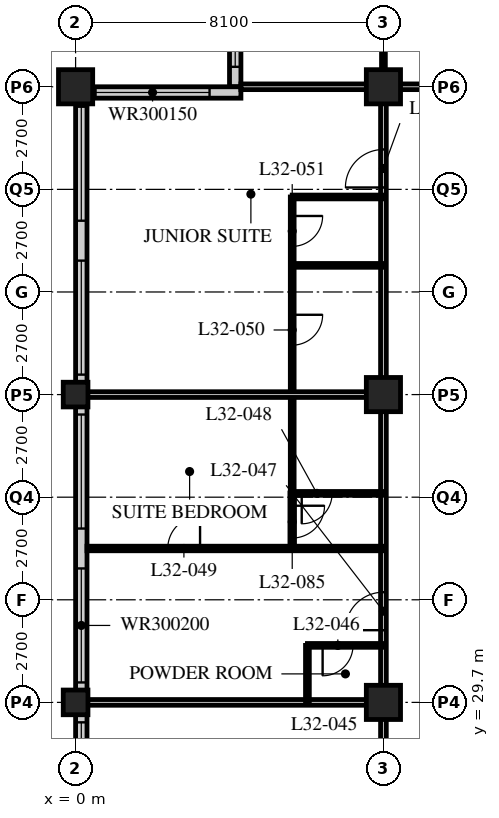
"""IFC4 building model, lengths in metres.
Left out: names, types, materials, properties, quantities, classifications, styles, units other than length and angle.
Written with IfcOpenShell. Run it as: python <this file> out.ifc"""

import sys

from ifc_helpers import new_model, si_unit, direction, frame, frame_2d, origin, origin_2d, place, context, subcontext, project, spatial, rectangle, hollow_rectangle, extrude, element, fill, save


model = new_model("IFC4")
c1 = context("Model", 3, precision=1e-05, world=origin(), true_north=direction((0.0, 1.0)))
c2 = subcontext(c1, "Body", "Model", "MODEL_VIEW")
j1 = project(units=[si_unit("LENGTHUNIT", "METRE"), si_unit("PLANEANGLEUNIT", "RADIAN")], contexts=[c1])
p1 = place(None, origin())
s1 = spatial("IfcSite", under=j1, at=p1, CompositionType="ELEMENT")
p2 = place(p1, origin())
s2 = spatial("IfcBuilding", under=s1, at=p2, CompositionType="ELEMENT")
p3 = place(p2, frame((0.0, 0.0, 127.2)))
s3 = spatial("IfcBuildingStorey", under=s2, at=p3, CompositionType="ELEMENT", Elevation=127.2)
for number, where, z_axis, x_axis in (
    (1, (0.0, 29.7, 0.0), (0.0, 0.0, 1.0), (1.0, 0.0, 0.0)),
    (2, (0.0, 37.8, 0.0), (0.0, 0.0, 1.0), (1.0, 0.0, 0.0)),
):
    element("IfcColumn", number, at=place(p3, frame(where, z_axis=z_axis, x_axis=x_axis)), inside=s3, PredefinedType="COLUMN", context=c2, shape_type="SweptSolid", body=[
        extrude(hollow_rectangle(XDim=0.65, YDim=0.65, WallThickness=0.055, at=origin_2d()), origin(), (0.0, 0.0, 1.0), 3.4),
    ])
for number, where, z_axis, x_axis in (
    (3, (0.0, 45.9, 0.0), (0.0, 0.0, 1.0), (1.0, 0.0, 0.0)),
    (4, (8.1, 29.7, 0.0), (0.0, 0.0, 1.0), (1.0, 0.0, 0.0)),
    (5, (8.1, 37.8, 0.0), (0.0, 0.0, 1.0), (1.0, 0.0, 0.0)),
    (6, (8.1, 45.9, 0.0), (0.0, 0.0, 1.0), (1.0, 0.0, 0.0)),
):
    element("IfcColumn", number, at=place(p3, frame(where, z_axis=z_axis, x_axis=x_axis)), inside=s3, PredefinedType="COLUMN", context=c2, shape_type="SweptSolid", body=[
        extrude(hollow_rectangle(XDim=0.9, YDim=0.9, WallThickness=0.09, at=origin_2d()), origin(), (0.0, 0.0, 1.0), 3.4),
    ])
p4 = place(p3, frame((4.2, 49.65, 0.0), z_axis=(0.0, 0.0, 1.0), x_axis=(0.0, -1.0, 0.0)))
e7 = element("IfcWall", 7, at=p4, inside=s3, PredefinedType="SOLIDWALL", context=c2, shape_type="SweptSolid", body=[
    extrude(rectangle(XDim=3.75, YDim=0.3, at=frame_2d((1.875, 0.0))), origin(), (0.0, 0.0, 1.0), 3.19),
])
p5 = place(p4, frame((0.225, 0.0, 0.9)))
e8 = element("IfcOpeningElement", 8, at=p5, cuts=e7, PredefinedType="OPENING", context=c2, shape_type="SweptSolid", body=[
    extrude(rectangle(XDim=3.0, YDim=1.5, at=frame_2d((1.5, 0.75))), frame((0.0, 0.16, 0.0), z_axis=(0.0, -1.0, 0.0), x_axis=(1.0, 0.0, 0.0)), (0.0, 0.0, 1.0), 0.32),
])
p6 = place(p3, frame((4.35, 45.75, 0.0), z_axis=(0.0, 0.0, 1.0), x_axis=(-1.0, 0.0, 0.0)))
e9 = element("IfcWall", 9, at=p6, inside=s3, PredefinedType="SOLIDWALL", context=c2, shape_type="SweptSolid", body=[
    extrude(rectangle(XDim=4.35, YDim=0.3, at=frame_2d((2.175, 0.0))), origin(), (0.0, 0.0, 1.0), 3.19),
])
p7 = place(p6, frame((0.825, 0.0, 0.9)))
e10 = element("IfcOpeningElement", 10, at=p7, cuts=e9, PredefinedType="OPENING", context=c2, shape_type="SweptSolid", body=[
    extrude(rectangle(XDim=3.0, YDim=1.5, at=frame_2d((1.5, 0.75))), frame((0.0, 0.16, 0.0), z_axis=(0.0, -1.0, 0.0), x_axis=(1.0, 0.0, 0.0)), (0.0, 0.0, 1.0), 0.32),
])
p8 = place(p3, frame((0.15, 45.6, 0.0), z_axis=(0.0, 0.0, 1.0), x_axis=(0.0, -1.0, 0.0)))
e11 = element("IfcWall", 11, at=p8, inside=s3, PredefinedType="SOLIDWALL", context=c2, shape_type="SweptSolid", body=[
    extrude(rectangle(XDim=32.1, YDim=0.3, at=frame_2d((16.05, 0.0))), origin(), (0.0, 0.0, 1.0), 3.19),
])
p9 = place(p8, frame((0.225, 0.0, 0.9)))
e12 = element("IfcOpeningElement", 12, at=p9, cuts=e11, PredefinedType="OPENING", context=c2, shape_type="SweptSolid", body=[
    extrude(rectangle(XDim=3.0, YDim=2.0, at=frame_2d((1.5, 1.0))), frame((0.0, 0.16, 0.0), z_axis=(0.0, -1.0, 0.0), x_axis=(1.0, 0.0, 0.0)), (0.0, 0.0, 1.0), 0.32),
])
p10 = place(p8, frame((4.275, 0.0, 0.9)))
e13 = element("IfcOpeningElement", 13, at=p10, cuts=e11, PredefinedType="OPENING", context=c2, shape_type="SweptSolid", body=[
    extrude(rectangle(XDim=3.0, YDim=2.0, at=frame_2d((1.5, 1.0))), frame((0.0, 0.16, 0.0), z_axis=(0.0, -1.0, 0.0), x_axis=(1.0, 0.0, 0.0)), (0.0, 0.0, 1.0), 0.32),
])
p11 = place(p8, frame((8.325, 0.0, 0.9)))
e14 = element("IfcOpeningElement", 14, at=p11, cuts=e11, PredefinedType="OPENING", context=c2, shape_type="SweptSolid", body=[
    extrude(rectangle(XDim=3.0, YDim=2.0, at=frame_2d((1.5, 1.0))), frame((0.0, 0.16, 0.0), z_axis=(0.0, -1.0, 0.0), x_axis=(1.0, 0.0, 0.0)), (0.0, 0.0, 1.0), 0.32),
])
p12 = place(p8, frame((12.375, 0.0, 0.9)))
e15 = element("IfcOpeningElement", 15, at=p12, cuts=e11, PredefinedType="OPENING", context=c2, shape_type="SweptSolid", body=[
    extrude(rectangle(XDim=3.0, YDim=2.0, at=frame_2d((1.5, 1.0))), frame((0.0, 0.16, 0.0), z_axis=(0.0, -1.0, 0.0), x_axis=(1.0, 0.0, 0.0)), (0.0, 0.0, 1.0), 0.32),
])
p13 = place(p8, frame((16.425, 0.0, 0.9)))
e16 = element("IfcOpeningElement", 16, at=p13, cuts=e11, PredefinedType="OPENING", context=c2, shape_type="SweptSolid", body=[
    extrude(rectangle(XDim=3.0, YDim=2.0, at=frame_2d((1.5, 1.0))), frame((0.0, 0.16, 0.0), z_axis=(0.0, -1.0, 0.0), x_axis=(1.0, 0.0, 0.0)), (0.0, 0.0, 1.0), 0.32),
])
p14 = place(p8, frame((20.475, 0.0, 0.9)))
e17 = element("IfcOpeningElement", 17, at=p14, cuts=e11, PredefinedType="OPENING", context=c2, shape_type="SweptSolid", body=[
    extrude(rectangle(XDim=3.0, YDim=2.0, at=frame_2d((1.5, 1.0))), frame((0.0, 0.16, 0.0), z_axis=(0.0, -1.0, 0.0), x_axis=(1.0, 0.0, 0.0)), (0.0, 0.0, 1.0), 0.32),
])
p15 = place(p8, frame((24.525, 0.0, 0.9)))
e18 = element("IfcOpeningElement", 18, at=p15, cuts=e11, PredefinedType="OPENING", context=c2, shape_type="SweptSolid", body=[
    extrude(rectangle(XDim=3.0, YDim=2.0, at=frame_2d((1.5, 1.0))), frame((0.0, 0.16, 0.0), z_axis=(0.0, -1.0, 0.0), x_axis=(1.0, 0.0, 0.0)), (0.0, 0.0, 1.0), 0.32),
])
p16 = place(p8, frame((28.575, 0.0, 0.9)))
e19 = element("IfcOpeningElement", 19, at=p16, cuts=e11, PredefinedType="OPENING", context=c2, shape_type="SweptSolid", body=[
    extrude(rectangle(XDim=3.0, YDim=2.0, at=frame_2d((1.5, 1.0))), frame((0.0, 0.16, 0.0), z_axis=(0.0, -1.0, 0.0), x_axis=(1.0, 0.0, 0.0)), (0.0, 0.0, 1.0), 0.32),
])
p17 = place(p3, frame((8.1, 45.9, 0.0), z_axis=(0.0, 0.0, 1.0), x_axis=(1.0, 0.0, 0.0)))
e20 = element("IfcWall", 20, at=p17, inside=s3, PredefinedType="PARTITIONING", context=c2, shape_type="SweptSolid", body=[
    extrude(rectangle(XDim=40.5, YDim=0.15, at=frame_2d((20.25, 0.0))), origin(), (0.0, 0.0, 1.0), 2.578),
])
p18 = place(p17, frame((9.625, 0.0, 0.0)))
e21 = element("IfcOpeningElement", 21, at=p18, cuts=e20, PredefinedType="OPENING", context=c2, shape_type="SweptSolid", body=[
    extrude(rectangle(XDim=1.0, YDim=2.1, at=frame_2d((0.5, 1.05))), frame((0.0, 0.085, 0.0), z_axis=(0.0, -1.0, 0.0), x_axis=(1.0, 0.0, 0.0)), (0.0, 0.0, 1.0), 0.17),
])
p19 = place(p17, frame((21.65, 0.0, 0.0)))
e22 = element("IfcOpeningElement", 22, at=p19, cuts=e20, PredefinedType="OPENING", context=c2, shape_type="SweptSolid", body=[
    extrude(rectangle(XDim=1.0, YDim=2.1, at=frame_2d((0.5, 1.05))), frame((0.0, 0.085, 0.0), z_axis=(0.0, -1.0, 0.0), x_axis=(1.0, 0.0, 0.0)), (0.0, 0.0, 1.0), 0.17),
])
p20 = place(p17, frame((26.75, 0.0, 0.0)))
e23 = element("IfcOpeningElement", 23, at=p20, cuts=e20, PredefinedType="OPENING", context=c2, shape_type="SweptSolid", body=[
    extrude(rectangle(XDim=1.0, YDim=2.1, at=frame_2d((0.5, 1.05))), frame((0.0, 0.085, 0.0), z_axis=(0.0, -1.0, 0.0), x_axis=(1.0, 0.0, 0.0)), (0.0, 0.0, 1.0), 0.17),
])
p21 = place(p17, frame((28.95, 0.0, 0.0)))
e24 = element("IfcOpeningElement", 24, at=p21, cuts=e20, PredefinedType="OPENING", context=c2, shape_type="SweptSolid", body=[
    extrude(rectangle(XDim=1.0, YDim=2.1, at=frame_2d((0.5, 1.05))), frame((0.0, 0.085, 0.0), z_axis=(0.0, -1.0, 0.0), x_axis=(1.0, 0.0, 0.0)), (0.0, 0.0, 1.0), 0.17),
])
p22 = place(p17, frame((34.85, 0.0, 0.0)))
e25 = element("IfcOpeningElement", 25, at=p22, cuts=e20, PredefinedType="OPENING", context=c2, shape_type="SweptSolid", body=[
    extrude(rectangle(XDim=1.0, YDim=2.1, at=frame_2d((0.5, 1.05))), frame((0.0, 0.085, 0.0), z_axis=(0.0, -1.0, 0.0), x_axis=(1.0, 0.0, 0.0)), (0.0, 0.0, 1.0), 0.17),
])
p23 = place(p17, frame((36.875, 0.0, 0.0)))
e26 = element("IfcOpeningElement", 26, at=p23, cuts=e20, PredefinedType="OPENING", context=c2, shape_type="SweptSolid", body=[
    extrude(rectangle(XDim=1.0, YDim=2.1, at=frame_2d((0.5, 1.05))), frame((0.0, 0.085, 0.0), z_axis=(0.0, -1.0, 0.0), x_axis=(1.0, 0.0, 0.0)), (0.0, 0.0, 1.0), 0.17),
])
p24 = place(p17, frame((2.625, 0.0, 0.0)))
e27 = element("IfcOpeningElement", 27, at=p24, cuts=e20, PredefinedType="OPENING", context=c2, shape_type="SweptSolid", body=[
    extrude(rectangle(XDim=1.0, YDim=2.1, at=frame_2d((0.5, 1.05))), frame((0.0, 0.085, 0.0), z_axis=(0.0, -1.0, 0.0), x_axis=(1.0, 0.0, 0.0)), (0.0, 0.0, 1.0), 0.17),
])
p25 = place(p3, frame((8.1, 21.6, 0.0), z_axis=(0.0, 0.0, 1.0), x_axis=(0.0, 1.0, 0.0)))
e28 = element("IfcWall", 28, at=p25, inside=s3, PredefinedType="PARTITIONING", context=c2, shape_type="SweptSolid", body=[
    extrude(rectangle(XDim=24.3, YDim=0.15, at=frame_2d((12.15, 0.0))), origin(), (0.0, 0.0, 1.0), 2.578),
])
p26 = place(p25, frame((5.45, 0.0, 0.0)))
e29 = element("IfcOpeningElement", 29, at=p26, cuts=e28, PredefinedType="OPENING", context=c2, shape_type="SweptSolid", body=[
    extrude(rectangle(XDim=1.0, YDim=2.1, at=frame_2d((0.5, 1.05))), frame((0.0, 0.085, 0.0), z_axis=(0.0, -1.0, 0.0), x_axis=(1.0, 0.0, 0.0)), (0.0, 0.0, 1.0), 0.17),
])
p27 = place(p25, frame((10.0, 0.0, 0.0)))
e30 = element("IfcOpeningElement", 30, at=p27, cuts=e28, PredefinedType="OPENING", context=c2, shape_type="SweptSolid", body=[
    extrude(rectangle(XDim=1.0, YDim=2.1, at=frame_2d((0.5, 1.05))), frame((0.0, 0.085, 0.0), z_axis=(0.0, -1.0, 0.0), x_axis=(1.0, 0.0, 0.0)), (0.0, 0.0, 1.0), 0.17),
])
p28 = place(p25, frame((21.65, 0.0, 0.0)))
e31 = element("IfcOpeningElement", 31, at=p28, cuts=e28, PredefinedType="OPENING", context=c2, shape_type="SweptSolid", body=[
    extrude(rectangle(XDim=1.0, YDim=2.1, at=frame_2d((0.5, 1.05))), frame((0.0, 0.085, 0.0), z_axis=(0.0, -1.0, 0.0), x_axis=(1.0, 0.0, 0.0)), (0.0, 0.0, 1.0), 0.17),
])
p29 = place(p3, frame((8.1, 29.7, 0.0), z_axis=(0.0, 0.0, 1.0), x_axis=(-1.0, 0.0, 0.0)))
e32 = element("IfcWall", 32, at=p29, inside=s3, PredefinedType="PARTITIONING", context=c2, shape_type="SweptSolid", body=[
    extrude(rectangle(XDim=7.8, YDim=0.15, at=frame_2d((3.9, 0.0))), origin(), (0.0, 0.0, 1.0), 2.578),
])
p30 = place(p3, frame((6.1, 29.7, 0.0), z_axis=(0.0, 0.0, 1.0), x_axis=(0.0, 1.0, 0.0)))
e33 = element("IfcWall", 33, at=p30, inside=s3, PredefinedType="PARTITIONING", context=c2, shape_type="SweptSolid", body=[
    extrude(rectangle(XDim=1.5, YDim=0.1, at=frame_2d((0.75, 0.0))), origin(), (0.0, 0.0, 1.0), 3.19),
])
p31 = place(p3, frame((8.1, 31.2, 0.0), z_axis=(0.0, 0.0, 1.0), x_axis=(-1.0, 0.0, 0.0)))
e34 = element("IfcWall", 34, at=p31, inside=s3, PredefinedType="PARTITIONING", context=c2, shape_type="SweptSolid", body=[
    extrude(rectangle(XDim=2.0, YDim=0.1, at=frame_2d((1.0, 0.0))), origin(), (0.0, 0.0, 1.0), 3.19),
])
p32 = place(p31, frame((0.8, 0.0, 0.0)))
e35 = element("IfcOpeningElement", 35, at=p32, cuts=e34, PredefinedType="OPENING", context=c2, shape_type="SweptSolid", body=[
    extrude(rectangle(XDim=0.8, YDim=2.1, at=frame_2d((0.4, 1.05))), frame((0.0, 0.06, 0.0), z_axis=(0.0, -1.0, 0.0), x_axis=(1.0, 0.0, 0.0)), (0.0, 0.0, 1.0), 0.12),
])
p33 = place(p3, frame((5.7, 35.2, 0.0), z_axis=(0.0, 0.0, 1.0), x_axis=(0.0, 1.0, 0.0)))
e36 = element("IfcWall", 36, at=p33, inside=s3, PredefinedType="PARTITIONING", context=c2, shape_type="SweptSolid", body=[
    extrude(rectangle(XDim=7.8, YDim=0.1, at=frame_2d((3.9, 0.0))), origin(), (0.0, 0.0, 1.0), 3.19),
])
p34 = place(p33, frame((3.9, 0.0, 0.0)))
e37 = element("IfcOpeningElement", 37, at=p34, cuts=e36, PredefinedType="OPENING", context=c2, shape_type="SweptSolid", body=[
    extrude(rectangle(XDim=0.8, YDim=2.1, at=frame_2d((0.4, 1.05))), frame((0.0, 0.06, 0.0), z_axis=(0.0, -1.0, 0.0), x_axis=(1.0, 0.0, 0.0)), (0.0, 0.0, 1.0), 0.12),
])
p35 = place(p33, frame((6.5, 0.0, 0.0)))
e38 = element("IfcOpeningElement", 38, at=p35, cuts=e36, PredefinedType="OPENING", context=c2, shape_type="SweptSolid", body=[
    extrude(rectangle(XDim=0.8, YDim=2.1, at=frame_2d((0.4, 1.05))), frame((0.0, 0.06, 0.0), z_axis=(0.0, -1.0, 0.0), x_axis=(1.0, 0.0, 0.0)), (0.0, 0.0, 1.0), 0.12),
])
p36 = place(p3, frame((8.1, 35.2, 0.0), z_axis=(0.0, 0.0, 1.0), x_axis=(-1.0, 0.0, 0.0)))
e39 = element("IfcWall", 39, at=p36, inside=s3, PredefinedType="PARTITIONING", context=c2, shape_type="SweptSolid", body=[
    extrude(rectangle(XDim=2.4, YDim=0.1, at=frame_2d((1.2, 0.0))), origin(), (0.0, 0.0, 1.0), 3.19),
])
p37 = place(p36, frame((1.35, 0.0, 0.0)))
e40 = element("IfcOpeningElement", 40, at=p37, cuts=e39, PredefinedType="OPENING", context=c2, shape_type="SweptSolid", body=[
    extrude(rectangle(XDim=0.8, YDim=2.1, at=frame_2d((0.4, 1.05))), frame((0.0, 0.06, 0.0), z_axis=(0.0, -1.0, 0.0), x_axis=(1.0, 0.0, 0.0)), (0.0, 0.0, 1.0), 0.12),
])
p38 = place(p3, frame((8.1, 33.75, 0.0), z_axis=(0.0, 0.0, 1.0), x_axis=(-1.0, 0.0, 0.0)))
e41 = element("IfcWall", 41, at=p38, inside=s3, PredefinedType="PARTITIONING", context=c2, shape_type="SweptSolid", body=[
    extrude(rectangle(XDim=7.8, YDim=0.12, at=frame_2d((3.9, 0.0))), origin(), (0.0, 0.0, 1.0), 3.19),
])
p39 = place(p38, frame((4.825, 0.0, 0.0)))
e42 = element("IfcOpeningElement", 42, at=p39, cuts=e41, PredefinedType="OPENING", context=c2, shape_type="SweptSolid", body=[
    extrude(rectangle(XDim=0.85, YDim=2.1, at=frame_2d((0.425, 1.05))), frame((0.0, 0.07, 0.0), z_axis=(0.0, -1.0, 0.0), x_axis=(1.0, 0.0, 0.0)), (0.0, 0.0, 1.0), 0.14),
])
p40 = place(p3, frame((8.1, 37.8, 0.0), z_axis=(0.0, 0.0, 1.0), x_axis=(-1.0, 0.0, 0.0)))
e43 = element("IfcWall", 43, at=p40, inside=s3, PredefinedType="PARTITIONING", context=c2, shape_type="SweptSolid", body=[
    extrude(rectangle(XDim=7.8, YDim=0.15, at=frame_2d((3.9, 0.0))), origin(), (0.0, 0.0, 1.0), 2.578),
])
for number, where, z_axis, x_axis in (
    (44, (8.1, 41.2, 0.0), (0.0, 0.0, 1.0), (-1.0, 0.0, 0.0)),
    (45, (8.1, 43.0, 0.0), (0.0, 0.0, 1.0), (-1.0, 0.0, 0.0)),
):
    element("IfcWall", number, at=place(p3, frame(where, z_axis=z_axis, x_axis=x_axis)), inside=s3, PredefinedType="PARTITIONING", context=c2, shape_type="SweptSolid", body=[
        extrude(rectangle(XDim=2.4, YDim=0.1, at=frame_2d((1.2, 0.0))), origin(), (0.0, 0.0, 1.0), 3.19),
    ])
p41 = place(p3, frame((8.1, 45.9, 0.0), z_axis=(0.0, 0.0, 1.0), x_axis=(0.0, 1.0, 0.0)))
e46 = element("IfcWall", 46, at=p41, inside=s3, PredefinedType="PARTITIONING", context=c2, shape_type="SweptSolid", body=[
    extrude(rectangle(XDim=2.4, YDim=0.1, at=frame_2d((1.2, 0.0))), origin(), (0.0, 0.0, 1.0), 2.578),
])
p42 = place(p3, frame((4.35, 45.9, 0.0), z_axis=(0.0, 0.0, 1.0), x_axis=(1.0, 0.0, 0.0)))
e47 = element("IfcWall", 47, at=p42, inside=s3, PredefinedType="PARTITIONING", context=c2, shape_type="SweptSolid", body=[
    extrude(rectangle(XDim=3.75, YDim=0.15, at=frame_2d((1.875, 0.0))), origin(), (0.0, 0.0, 1.0), 2.578),
])
p43 = place(p3, frame((5.7, 33.75, 0.0), z_axis=(0.0, 0.0, 1.0), x_axis=(0.0, 1.0, 0.0)))
e48 = element("IfcWall", 48, at=p43, inside=s3, PredefinedType="PARTITIONING", context=c2, shape_type="SweptSolid", body=[
    extrude(rectangle(XDim=1.46, YDim=0.12, at=frame_2d((0.73, 0.0))), origin(), (0.0, 0.0, 1.0), 3.19),
])
p44 = place(p43, frame((0.275, 0.0, 0.0)))
e49 = element("IfcOpeningElement", 49, at=p44, cuts=e48, PredefinedType="OPENING", context=c2, shape_type="SweptSolid", body=[
    extrude(rectangle(XDim=0.85, YDim=2.1, at=frame_2d((0.425, 1.05))), frame((0.0, 0.07, 0.0), z_axis=(0.0, -1.0, 0.0), x_axis=(1.0, 0.0, 0.0)), (0.0, 0.0, 1.0), 0.14),
])
p45 = place(p5, origin())
e50 = element("IfcWindow", 50, at=p45, inside=s3, PartitioningType="SINGLE_PANEL", PredefinedType="WINDOW", context=c2, shape_type="SweptSolid", body=[
    extrude(rectangle(XDim=3.0, YDim=1.5, at=frame_2d((1.5, 0.75))), frame((0.0, 0.03, 0.0), z_axis=(0.0, -1.0, 0.0), x_axis=(1.0, 0.0, 0.0)), (0.0, 0.0, 1.0), 0.06),
])
fill(e8, e50)
p46 = place(p7, origin())
e51 = element("IfcWindow", 51, at=p46, inside=s3, PartitioningType="SINGLE_PANEL", PredefinedType="WINDOW", context=c2, shape_type="SweptSolid", body=[
    extrude(rectangle(XDim=3.0, YDim=1.5, at=frame_2d((1.5, 0.75))), frame((0.0, 0.03, 0.0), z_axis=(0.0, -1.0, 0.0), x_axis=(1.0, 0.0, 0.0)), (0.0, 0.0, 1.0), 0.06),
])
fill(e10, e51)
p47 = place(p9, origin())
e52 = element("IfcWindow", 52, at=p47, inside=s3, PartitioningType="SINGLE_PANEL", PredefinedType="WINDOW", context=c2, shape_type="SweptSolid", body=[
    extrude(rectangle(XDim=3.0, YDim=2.0, at=frame_2d((1.5, 1.0))), frame((0.0, 0.03, 0.0), z_axis=(0.0, -1.0, 0.0), x_axis=(1.0, 0.0, 0.0)), (0.0, 0.0, 1.0), 0.06),
])
fill(e12, e52)
p48 = place(p10, origin())
e53 = element("IfcWindow", 53, at=p48, inside=s3, PartitioningType="SINGLE_PANEL", PredefinedType="WINDOW", context=c2, shape_type="SweptSolid", body=[
    extrude(rectangle(XDim=3.0, YDim=2.0, at=frame_2d((1.5, 1.0))), frame((0.0, 0.03, 0.0), z_axis=(0.0, -1.0, 0.0), x_axis=(1.0, 0.0, 0.0)), (0.0, 0.0, 1.0), 0.06),
])
fill(e13, e53)
p49 = place(p11, origin())
e54 = element("IfcWindow", 54, at=p49, inside=s3, PartitioningType="SINGLE_PANEL", PredefinedType="WINDOW", context=c2, shape_type="SweptSolid", body=[
    extrude(rectangle(XDim=3.0, YDim=2.0, at=frame_2d((1.5, 1.0))), frame((0.0, 0.03, 0.0), z_axis=(0.0, -1.0, 0.0), x_axis=(1.0, 0.0, 0.0)), (0.0, 0.0, 1.0), 0.06),
])
fill(e14, e54)
p50 = place(p12, origin())
e55 = element("IfcWindow", 55, at=p50, inside=s3, PartitioningType="SINGLE_PANEL", PredefinedType="WINDOW", context=c2, shape_type="SweptSolid", body=[
    extrude(rectangle(XDim=3.0, YDim=2.0, at=frame_2d((1.5, 1.0))), frame((0.0, 0.03, 0.0), z_axis=(0.0, -1.0, 0.0), x_axis=(1.0, 0.0, 0.0)), (0.0, 0.0, 1.0), 0.06),
])
fill(e15, e55)
p51 = place(p13, origin())
e56 = element("IfcWindow", 56, at=p51, inside=s3, PartitioningType="SINGLE_PANEL", PredefinedType="WINDOW", context=c2, shape_type="SweptSolid", body=[
    extrude(rectangle(XDim=3.0, YDim=2.0, at=frame_2d((1.5, 1.0))), frame((0.0, 0.03, 0.0), z_axis=(0.0, -1.0, 0.0), x_axis=(1.0, 0.0, 0.0)), (0.0, 0.0, 1.0), 0.06),
])
fill(e16, e56)
p52 = place(p32, origin())
e57 = element("IfcDoor", 57, at=p52, inside=s3, OperationType="SINGLE_SWING_RIGHT", PredefinedType="DOOR", context=c2, shape_type="SweptSolid", body=[
    extrude(rectangle(XDim=0.8, YDim=2.1, at=frame_2d((0.4, 1.05))), frame((0.0, 0.025, 0.0), z_axis=(0.0, -1.0, 0.0), x_axis=(1.0, 0.0, 0.0)), (0.0, 0.0, 1.0), 0.05),
])
fill(e35, e57)
p53 = place(p27, origin())
e58 = element("IfcDoor", 58, at=p53, inside=s3, OperationType="SINGLE_SWING_LEFT", PredefinedType="DOOR", context=c2, shape_type="SweptSolid", body=[
    extrude(rectangle(XDim=1.0, YDim=2.1, at=frame_2d((0.5, 1.05))), frame((0.0, 0.025, 0.0), z_axis=(0.0, -1.0, 0.0), x_axis=(1.0, 0.0, 0.0)), (0.0, 0.0, 1.0), 0.05),
])
fill(e30, e58)
p54 = place(p37, origin())
e59 = element("IfcDoor", 59, at=p54, inside=s3, OperationType="SINGLE_SWING_RIGHT", PredefinedType="DOOR", context=c2, shape_type="SweptSolid", body=[
    extrude(rectangle(XDim=0.8, YDim=2.1, at=frame_2d((0.4, 1.05))), frame((0.0, 0.025, 0.0), z_axis=(0.0, -1.0, 0.0), x_axis=(1.0, 0.0, 0.0)), (0.0, 0.0, 1.0), 0.05),
])
fill(e40, e59)
p55 = place(p39, origin())
e60 = element("IfcDoor", 60, at=p55, inside=s3, OperationType="SINGLE_SWING_RIGHT", PredefinedType="DOOR", context=c2, shape_type="SweptSolid", body=[
    extrude(rectangle(XDim=0.85, YDim=2.1, at=frame_2d((0.425, 1.05))), frame((0.0, 0.025, 0.0), z_axis=(0.0, -1.0, 0.0), x_axis=(1.0, 0.0, 0.0)), (0.0, 0.0, 1.0), 0.05),
])
fill(e42, e60)
p56 = place(p34, origin())
e61 = element("IfcDoor", 61, at=p56, inside=s3, OperationType="SINGLE_SWING_LEFT", PredefinedType="DOOR", context=c2, shape_type="SweptSolid", body=[
    extrude(rectangle(XDim=0.8, YDim=2.1, at=frame_2d((0.4, 1.05))), frame((0.0, 0.025, 0.0), z_axis=(0.0, -1.0, 0.0), x_axis=(1.0, 0.0, 0.0)), (0.0, 0.0, 1.0), 0.05),
])
fill(e37, e61)
p57 = place(p35, origin())
e62 = element("IfcDoor", 62, at=p57, inside=s3, OperationType="SINGLE_SWING_LEFT", PredefinedType="DOOR", context=c2, shape_type="SweptSolid", body=[
    extrude(rectangle(XDim=0.8, YDim=2.1, at=frame_2d((0.4, 1.05))), frame((0.0, 0.025, 0.0), z_axis=(0.0, -1.0, 0.0), x_axis=(1.0, 0.0, 0.0)), (0.0, 0.0, 1.0), 0.05),
])
fill(e38, e62)
p58 = place(p28, origin())
e63 = element("IfcDoor", 63, at=p58, inside=s3, OperationType="SINGLE_SWING_LEFT", PredefinedType="DOOR", context=c2, shape_type="SweptSolid", body=[
    extrude(rectangle(XDim=1.0, YDim=2.1, at=frame_2d((0.5, 1.05))), frame((0.0, 0.025, 0.0), z_axis=(0.0, -1.0, 0.0), x_axis=(1.0, 0.0, 0.0)), (0.0, 0.0, 1.0), 0.05),
])
fill(e31, e63)
p59 = place(p44, origin())
e64 = element("IfcDoor", 64, at=p59, inside=s3, OperationType="SINGLE_SWING_LEFT", PredefinedType="DOOR", context=c2, shape_type="SweptSolid", body=[
    extrude(rectangle(XDim=0.85, YDim=2.1, at=frame_2d((0.425, 1.05))), frame((0.0, 0.025, 0.0), z_axis=(0.0, -1.0, 0.0), x_axis=(1.0, 0.0, 0.0)), (0.0, 0.0, 1.0), 0.05),
])
fill(e49, e64)
save(model, sys.argv[1])
